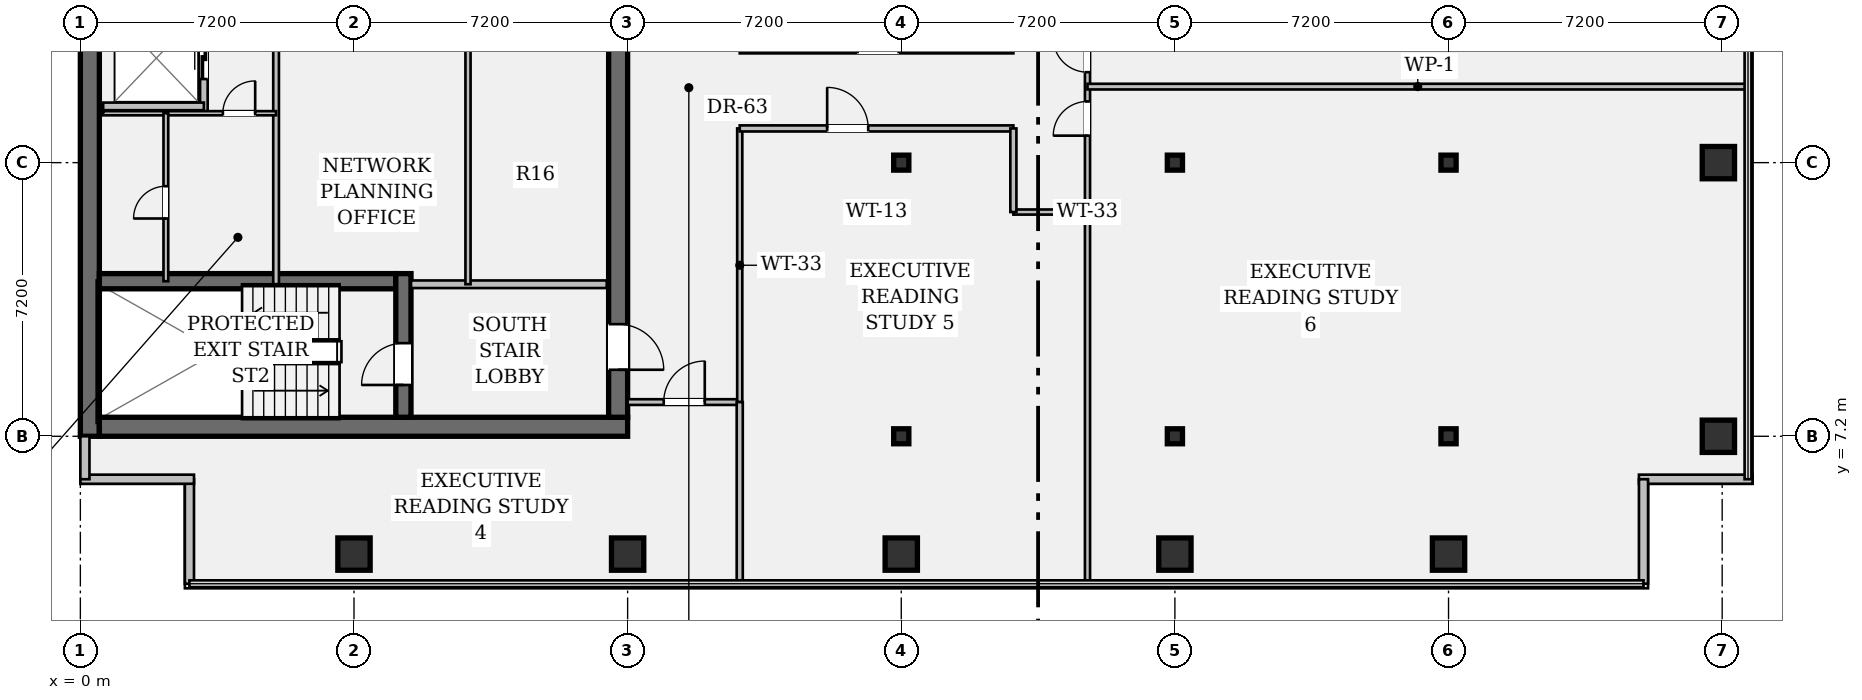
"""IFC4 building model, lengths in metres.
Left out: names, types, materials, properties, quantities, classifications, styles, units other than length and angle.
Written with IfcOpenShell. Run it as: python <this file> out.ifc"""

import sys

from ifc_helpers import new_model, si_unit, direction, frame, frame_2d, origin, origin_2d, place, context, subcontext, project, spatial, rectangle, hollow_rectangle, i_section, extrude, element, fill, save


model = new_model("IFC4")
c1 = context("Model", 3, precision=1e-05, world=origin(), true_north=direction((0.0, 1.0)))
c2 = subcontext(c1, "Body", "Model", "MODEL_VIEW")
j1 = project(units=[si_unit("LENGTHUNIT", "METRE"), si_unit("PLANEANGLEUNIT", "RADIAN")], contexts=[c1])
p1 = place(None, origin())
s1 = spatial("IfcSite", under=j1, at=p1, CompositionType="ELEMENT")
p2 = place(p1, origin())
s2 = spatial("IfcBuilding", under=s1, at=p2, CompositionType="ELEMENT")
p3 = place(p2, frame((0.0, 0.0, 180.25)))
s3 = spatial("IfcBuildingStorey", under=s2, at=p3, CompositionType="ELEMENT", Elevation=180.25)
p4 = place(p3, frame((0.25, 7.2, 0.0), z_axis=(0.0, 0.0, 1.0), x_axis=(0.0, 1.0, 0.0)))
e1 = element("IfcWall", 1, at=p4, inside=s3, PredefinedType="SHEAR", context=c2, shape_type="SweptSolid", body=[
    extrude(rectangle(XDim=28.8, YDim=0.5, at=frame_2d((14.4, 0.0))), origin(), (0.0, 0.0, 1.0), 3.24),
])
p5 = place(p3, frame((0.5, 7.45, 0.0), z_axis=(0.0, 0.0, 1.0), x_axis=(1.0, 0.0, 0.0)))
e2 = element("IfcWall", 2, at=p5, inside=s3, PredefinedType="SHEAR", context=c2, shape_type="SweptSolid", body=[
    extrude(rectangle(XDim=13.9, YDim=0.5, at=frame_2d((6.95, 0.0))), origin(), (0.0, 0.0, 1.0), 3.24),
])
p6 = place(p3, frame((14.15, 35.5, 0.0), z_axis=(0.0, 0.0, 1.0), x_axis=(0.0, -1.0, 0.0)))
e3 = element("IfcWall", 3, at=p6, inside=s3, PredefinedType="SHEAR", context=c2, shape_type="SweptSolid", body=[
    extrude(rectangle(XDim=27.8, YDim=0.5, at=frame_2d((13.9, 0.0))), origin(), (0.0, 0.0, 1.0), 3.24),
])
p7 = place(p6, frame((1.4, 0.0, 0.0)))
e4 = element("IfcOpeningElement", 4, at=p7, cuts=e3, PredefinedType="OPENING", context=c2, shape_type="SweptSolid", body=[
    extrude(rectangle(XDim=1.2, YDim=2.15, at=frame_2d((0.6, 1.075))), frame((0.0, 0.262, 0.0), z_axis=(0.0, -1.0, 0.0), x_axis=(1.0, 0.0, 0.0)), (0.0, 0.0, 1.0), 0.524),
])
p8 = place(p6, frame((25.35, 0.0, 0.0)))
e5 = element("IfcOpeningElement", 5, at=p8, cuts=e3, PredefinedType="OPENING", context=c2, shape_type="SweptSolid", body=[
    extrude(rectangle(XDim=1.2, YDim=2.15, at=frame_2d((0.6, 1.075))), frame((0.0, 0.262, 0.0), z_axis=(0.0, -1.0, 0.0), x_axis=(1.0, 0.0, 0.0)), (0.0, 0.0, 1.0), 0.524),
])
p9 = place(p6, frame((14.7, 0.0, 0.0)))
e6 = element("IfcOpeningElement", 6, at=p9, cuts=e3, PredefinedType="OPENING", context=c2, shape_type="SweptSolid", body=[
    extrude(rectangle(XDim=1.6, YDim=2.2, at=frame_2d((0.8, 1.1))), frame((0.0, 0.262, 0.0), z_axis=(0.0, -1.0, 0.0), x_axis=(1.0, 0.0, 0.0)), (0.0, 0.0, 1.0), 0.524),
])
p10 = place(p3, frame((0.5, 11.28, 0.0), z_axis=(0.0, 0.0, 1.0), x_axis=(1.0, 0.0, 0.0)))
e7 = element("IfcWall", 7, at=p10, inside=s3, PredefinedType="SHEAR", context=c2, shape_type="SweptSolid", body=[
    extrude(rectangle(XDim=7.8, YDim=0.4, at=frame_2d((3.9, 0.0))), origin(), (0.0, 0.0, 1.0), 3.24),
])
p11 = place(p3, frame((8.5, 7.7, 0.0), z_axis=(0.0, 0.0, 1.0), x_axis=(0.0, 1.0, 0.0)))
e8 = element("IfcWall", 8, at=p11, inside=s3, PredefinedType="SHEAR", context=c2, shape_type="SweptSolid", body=[
    extrude(rectangle(XDim=3.78, YDim=0.4, at=frame_2d((1.89, 0.0))), origin(), (0.0, 0.0, 1.0), 3.24),
])
p12 = place(p11, frame((0.85, 0.0, 0.0)))
e9 = element("IfcOpeningElement", 9, at=p12, cuts=e8, PredefinedType="OPENING", context=c2, shape_type="SweptSolid", body=[
    extrude(rectangle(XDim=1.1, YDim=2.15, at=frame_2d((0.55, 1.075))), frame((0.0, 0.212, 0.0), z_axis=(0.0, -1.0, 0.0), x_axis=(1.0, 0.0, 0.0)), (0.0, 0.0, 1.0), 0.424),
])
for number, where, z_axis, x_axis in (
    (10, (7.2, 4.1, 0.0), (0.0, 0.0, 1.0), (1.0, 0.0, 0.0)),
    (11, (14.4, 4.1, 0.0), (0.0, 0.0, 1.0), (1.0, 0.0, 0.0)),
    (12, (21.6, 4.1, 0.0), (0.0, 0.0, 1.0), (1.0, 0.0, 0.0)),
):
    element("IfcColumn", number, at=place(p3, frame(where, z_axis=z_axis, x_axis=x_axis)), inside=s3, PredefinedType="COLUMN", context=c2, shape_type="SweptSolid", body=[
        extrude(hollow_rectangle(XDim=0.85, YDim=0.85, WallThickness=0.05, at=origin_2d()), origin(), (0.0, 0.0, 1.0), 3.24),
    ])
for number, where, z_axis, x_axis in (
    (13, (21.6, 7.2, 0.0), (0.0, 0.0, 1.0), (1.0, 0.0, 0.0)),
    (14, (21.6, 14.4, 0.0), (0.0, 0.0, 1.0), (1.0, 0.0, 0.0)),
):
    element("IfcColumn", number, at=place(p3, frame(where, z_axis=z_axis, x_axis=x_axis)), inside=s3, PredefinedType="COLUMN", context=c2, shape_type="SweptSolid", body=[
        extrude(i_section(OverallWidth=0.399, OverallDepth=0.394, WebThickness=0.023, FlangeThickness=0.037, FilletRadius=0.018, at=origin_2d()), origin(), (0.0, 0.0, 1.0), 3.24),
    ])
p13 = place(p3, frame((28.8, 4.1, 0.0), z_axis=(0.0, 0.0, 1.0), x_axis=(1.0, 0.0, 0.0)))
e15 = element("IfcColumn", 15, at=p13, inside=s3, PredefinedType="COLUMN", context=c2, shape_type="SweptSolid", body=[
    extrude(hollow_rectangle(XDim=0.85, YDim=0.85, WallThickness=0.05, at=origin_2d()), origin(), (0.0, 0.0, 1.0), 3.24),
])
for number, where, z_axis, x_axis in (
    (16, (28.8, 7.2, 0.0), (0.0, 0.0, 1.0), (1.0, 0.0, 0.0)),
    (17, (28.8, 14.4, 0.0), (0.0, 0.0, 1.0), (1.0, 0.0, 0.0)),
):
    element("IfcColumn", number, at=place(p3, frame(where, z_axis=z_axis, x_axis=x_axis)), inside=s3, PredefinedType="COLUMN", context=c2, shape_type="SweptSolid", body=[
        extrude(i_section(OverallWidth=0.399, OverallDepth=0.394, WebThickness=0.023, FlangeThickness=0.037, FilletRadius=0.018, at=origin_2d()), origin(), (0.0, 0.0, 1.0), 3.24),
    ])
p14 = place(p3, frame((36.0, 4.1, 0.0), z_axis=(0.0, 0.0, 1.0), x_axis=(1.0, 0.0, 0.0)))
e18 = element("IfcColumn", 18, at=p14, inside=s3, PredefinedType="COLUMN", context=c2, shape_type="SweptSolid", body=[
    extrude(hollow_rectangle(XDim=0.85, YDim=0.85, WallThickness=0.05, at=origin_2d()), origin(), (0.0, 0.0, 1.0), 3.24),
])
for number, where, z_axis, x_axis in (
    (19, (36.0, 7.2, 0.0), (0.0, 0.0, 1.0), (1.0, 0.0, 0.0)),
    (20, (36.0, 14.4, 0.0), (0.0, 0.0, 1.0), (1.0, 0.0, 0.0)),
):
    element("IfcColumn", number, at=place(p3, frame(where, z_axis=z_axis, x_axis=x_axis)), inside=s3, PredefinedType="COLUMN", context=c2, shape_type="SweptSolid", body=[
        extrude(i_section(OverallWidth=0.399, OverallDepth=0.394, WebThickness=0.023, FlangeThickness=0.037, FilletRadius=0.018, at=origin_2d()), origin(), (0.0, 0.0, 1.0), 3.24),
    ])
for number, where, z_axis, x_axis in (
    (21, (43.1, 7.2, 0.0), (0.0, 0.0, 1.0), (1.0, 0.0, 0.0)),
    (22, (43.1, 14.4, 0.0), (0.0, 0.0, 1.0), (1.0, 0.0, 0.0)),
):
    element("IfcColumn", number, at=place(p3, frame(where, z_axis=z_axis, x_axis=x_axis)), inside=s3, PredefinedType="COLUMN", context=c2, shape_type="SweptSolid", body=[
        extrude(hollow_rectangle(XDim=0.85, YDim=0.85, WallThickness=0.05, at=origin_2d()), origin(), (0.0, 0.0, 1.0), 3.24),
    ])
p15 = place(p3, frame((2.87, 3.32, 0.0), z_axis=(0.0, 0.0, 1.0), x_axis=(0.0, 1.0, 0.0)))
e23 = element("IfcWall", 23, at=p15, inside=s3, PredefinedType="STANDARD", context=c2, shape_type="SweptSolid", body=[
    extrude(rectangle(XDim=2.75, YDim=0.24, at=frame_2d((1.375, 0.0))), origin(), (0.0, 0.0, 1.0), 3.24),
])
p16 = place(p3, frame((2.99, 6.07, 0.0), z_axis=(0.0, 0.0, 1.0), x_axis=(-1.0, 0.0, 0.0)))
e24 = element("IfcWall", 24, at=p16, inside=s3, PredefinedType="STANDARD", context=c2, shape_type="SweptSolid", body=[
    extrude(rectangle(XDim=2.99, YDim=0.24, at=frame_2d((1.495, 0.0))), origin(), (0.0, 0.0, 1.0), 3.24),
])
p17 = place(p3, frame((0.12, 6.07, 0.0), z_axis=(0.0, 0.0, 1.0), x_axis=(0.0, 1.0, 0.0)))
e25 = element("IfcWall", 25, at=p17, inside=s3, PredefinedType="STANDARD", context=c2, shape_type="SweptSolid", body=[
    extrude(rectangle(XDim=1.13, YDim=0.24, at=frame_2d((0.565, 0.0))), origin(), (0.0, 0.0, 1.0), 3.24),
])
p18 = place(p3, frame((44.0, 6.07, 0.0), z_axis=(0.0, 0.0, 1.0), x_axis=(-1.0, 0.0, 0.0)))
e26 = element("IfcWall", 26, at=p18, inside=s3, PredefinedType="STANDARD", context=c2, shape_type="SweptSolid", body=[
    extrude(rectangle(XDim=2.99, YDim=0.24, at=frame_2d((1.495, 0.0))), origin(), (0.0, 0.0, 1.0), 3.24),
])
p19 = place(p3, frame((41.13, 6.07, 0.0), z_axis=(0.0, 0.0, 1.0), x_axis=(0.0, -1.0, 0.0)))
e27 = element("IfcWall", 27, at=p19, inside=s3, PredefinedType="STANDARD", context=c2, shape_type="SweptSolid", body=[
    extrude(rectangle(XDim=2.75, YDim=0.24, at=frame_2d((1.375, 0.0))), origin(), (0.0, 0.0, 1.0), 3.24),
])
p20 = place(p3, frame((8.7, 11.2, 0.0), z_axis=(0.0, 0.0, 1.0), x_axis=(1.0, 0.0, 0.0)))
e28 = element("IfcWall", 28, at=p20, inside=s3, PredefinedType="PARTITIONING", context=c2, shape_type="SweptSolid", body=[
    extrude(rectangle(XDim=5.15, YDim=0.2, at=frame_2d((2.575, 0.0))), origin(), (0.0, 0.0, 1.0), 3.24),
])
p21 = place(p3, frame((3.25, 15.7, 0.0), z_axis=(0.0, 0.0, 1.0), x_axis=(0.0, 1.0, 0.0)))
e29 = element("IfcWall", 29, at=p21, inside=s3, PredefinedType="PARTITIONING", context=c2, shape_type="SweptSolid", body=[
    extrude(rectangle(XDim=13.08, YDim=0.2, at=frame_2d((6.54, 0.0))), origin(), (0.0, 0.0, 1.0), 3.24),
])
p22 = place(p21, frame((0.9, 0.0, 0.0)))
e30 = element("IfcOpeningElement", 30, at=p22, cuts=e29, PredefinedType="OPENING", context=c2, shape_type="SweptSolid", body=[
    extrude(rectangle(XDim=1.1, YDim=2.2, at=frame_2d((0.55, 1.1))), frame((0.0, 0.112, 0.0), z_axis=(0.0, -1.0, 0.0), x_axis=(1.0, 0.0, 0.0)), (0.0, 0.0, 1.0), 0.224),
])
p23 = place(p21, frame((3.5, 0.0, 0.0)))
e31 = element("IfcOpeningElement", 31, at=p23, cuts=e29, PredefinedType="OPENING", context=c2, shape_type="SweptSolid", body=[
    extrude(rectangle(XDim=1.1, YDim=2.2, at=frame_2d((0.55, 1.1))), frame((0.0, 0.112, 0.0), z_axis=(0.0, -1.0, 0.0), x_axis=(1.0, 0.0, 0.0)), (0.0, 0.0, 1.0), 0.224),
])
p24 = place(p21, frame((7.2, 0.0, 0.0)))
e32 = element("IfcOpeningElement", 32, at=p24, cuts=e29, PredefinedType="OPENING", context=c2, shape_type="SweptSolid", body=[
    extrude(rectangle(XDim=1.1, YDim=2.2, at=frame_2d((0.55, 1.1))), frame((0.0, 0.112, 0.0), z_axis=(0.0, -1.0, 0.0), x_axis=(1.0, 0.0, 0.0)), (0.0, 0.0, 1.0), 0.224),
])
p25 = place(p21, frame((9.8, 0.0, 0.0)))
e33 = element("IfcOpeningElement", 33, at=p25, cuts=e29, PredefinedType="OPENING", context=c2, shape_type="SweptSolid", body=[
    extrude(rectangle(XDim=1.1, YDim=2.2, at=frame_2d((0.55, 1.1))), frame((0.0, 0.112, 0.0), z_axis=(0.0, -1.0, 0.0), x_axis=(1.0, 0.0, 0.0)), (0.0, 0.0, 1.0), 0.224),
])
p26 = place(p3, frame((0.6, 15.88, 0.0), z_axis=(0.0, 0.0, 1.0), x_axis=(1.0, 0.0, 0.0)))
e34 = element("IfcWall", 34, at=p26, inside=s3, PredefinedType="PARTITIONING", context=c2, shape_type="SweptSolid", body=[
    extrude(rectangle(XDim=2.65, YDim=0.2, at=frame_2d((1.325, 0.0))), origin(), (0.0, 0.0, 1.0), 3.24),
])
p27 = place(p3, frame((5.15, 11.2, 0.0), z_axis=(0.0, 0.0, 1.0), x_axis=(0.0, 1.0, 0.0)))
e35 = element("IfcWall", 35, at=p27, inside=s3, PredefinedType="PARTITIONING", context=c2, shape_type="SweptSolid", body=[
    extrude(rectangle(XDim=6.6, YDim=0.15, at=frame_2d((3.3, 0.0))), origin(), (0.0, 0.0, 1.0), 3.24),
])
p28 = place(p3, frame((10.2, 11.2, 0.0), z_axis=(0.0, 0.0, 1.0), x_axis=(0.0, 1.0, 0.0)))
e36 = element("IfcWall", 36, at=p28, inside=s3, PredefinedType="PARTITIONING", context=c2, shape_type="SweptSolid", body=[
    extrude(rectangle(XDim=6.6, YDim=0.135, at=frame_2d((3.3, 0.0))), origin(), (0.0, 0.0, 1.0), 3.24),
])
p29 = place(p3, frame((0.6, 15.7, 0.0), z_axis=(0.0, 0.0, 1.0), x_axis=(1.0, 0.0, 0.0)))
e37 = element("IfcWall", 37, at=p29, inside=s3, PredefinedType="PARTITIONING", context=c2, shape_type="SweptSolid", body=[
    extrude(rectangle(XDim=4.55, YDim=0.11, at=frame_2d((2.275, 0.0))), origin(), (0.0, 0.0, 1.0), 3.24),
])
p30 = place(p29, frame((3.15, 0.0, 0.0)))
e38 = element("IfcOpeningElement", 38, at=p30, cuts=e37, PredefinedType="OPENING", context=c2, shape_type="SweptSolid", body=[
    extrude(rectangle(XDim=0.85, YDim=2.15, at=frame_2d((0.425, 1.075))), frame((0.0, 0.067, 0.0), z_axis=(0.0, -1.0, 0.0), x_axis=(1.0, 0.0, 0.0)), (0.0, 0.0, 1.0), 0.134),
])
p31 = place(p3, frame((2.25, 11.28, 0.0), z_axis=(0.0, 0.0, 1.0), x_axis=(0.0, 1.0, 0.0)))
e39 = element("IfcWall", 39, at=p31, inside=s3, PredefinedType="PARTITIONING", context=c2, shape_type="SweptSolid", body=[
    extrude(rectangle(XDim=4.42, YDim=0.125, at=frame_2d((2.21, 0.0))), origin(), (0.0, 0.0, 1.0), 3.24),
])
p32 = place(p31, frame((1.65, 0.0, 0.0)))
e40 = element("IfcOpeningElement", 40, at=p32, cuts=e39, PredefinedType="OPENING", context=c2, shape_type="SweptSolid", body=[
    extrude(rectangle(XDim=0.85, YDim=2.15, at=frame_2d((0.425, 1.075))), frame((0.0, 0.074, 0.0), z_axis=(0.0, -1.0, 0.0), x_axis=(1.0, 0.0, 0.0)), (0.0, 0.0, 1.0), 0.149),
])
p33 = place(p3, frame((14.4, 8.1, 0.0), z_axis=(0.0, 0.0, 1.0), x_axis=(1.0, 0.0, 0.0)))
e41 = element("IfcWall", 41, at=p33, inside=s3, PredefinedType="PARTITIONING", context=c2, shape_type="SweptSolid", body=[
    extrude(rectangle(XDim=2.95, YDim=0.15, at=frame_2d((1.475, 0.0))), origin(), (0.0, 0.0, 1.0), 2.808),
])
p34 = place(p33, frame((0.95, 0.0, 0.0)))
e42 = element("IfcOpeningElement", 42, at=p34, cuts=e41, PredefinedType="OPENING", context=c2, shape_type="SweptSolid", body=[
    extrude(rectangle(XDim=1.08, YDim=2.15, at=frame_2d((0.54, 1.075))), frame((0.0, 0.087, 0.0), z_axis=(0.0, -1.0, 0.0), x_axis=(1.0, 0.0, 0.0)), (0.0, 0.0, 1.0), 0.174),
])
p35 = place(p3, frame((17.35, 8.1, 0.0), z_axis=(0.0, 0.0, 1.0), x_axis=(0.0, 1.0, 0.0)))
e43 = element("IfcWall", 43, at=p35, inside=s3, PredefinedType="PARTITIONING", context=c2, shape_type="SweptSolid", body=[
    extrude(rectangle(XDim=7.2, YDim=0.135, at=frame_2d((3.6, 0.0))), origin(), (0.0, 0.0, 1.0), 2.603),
])
p36 = place(p3, frame((17.35, 15.3, 0.0), z_axis=(0.0, 0.0, 1.0), x_axis=(1.0, 0.0, 0.0)))
e44 = element("IfcWall", 44, at=p36, inside=s3, PredefinedType="PARTITIONING", context=c2, shape_type="SweptSolid", body=[
    extrude(rectangle(XDim=7.2, YDim=0.16, at=frame_2d((3.6, 0.0))), origin(), (0.0, 0.0, 1.0), 2.603),
])
p37 = place(p36, frame((2.3, 0.0, 0.0)))
e45 = element("IfcOpeningElement", 45, at=p37, cuts=e44, PredefinedType="OPENING", context=c2, shape_type="SweptSolid", body=[
    extrude(rectangle(XDim=1.08, YDim=2.15, at=frame_2d((0.54, 1.075))), frame((0.0, 0.092, 0.0), z_axis=(0.0, -1.0, 0.0), x_axis=(1.0, 0.0, 0.0)), (0.0, 0.0, 1.0), 0.184),
])
p38 = place(p3, frame((17.35, 17.35, 0.0), z_axis=(0.0, 0.0, 1.0), x_axis=(1.0, 0.0, 0.0)))
e46 = element("IfcWall", 46, at=p38, inside=s3, PredefinedType="PARTITIONING", context=c2, shape_type="SweptSolid", body=[
    extrude(rectangle(XDim=7.2, YDim=0.15, at=frame_2d((3.6, 0.0))), origin(), (0.0, 0.0, 1.0), 2.603),
])
p39 = place(p38, frame((3.1, 0.0, 0.0)))
e47 = element("IfcOpeningElement", 47, at=p39, cuts=e46, PredefinedType="OPENING", context=c2, shape_type="SweptSolid", body=[
    extrude(rectangle(XDim=1.08, YDim=2.15, at=frame_2d((0.54, 1.075))), frame((0.0, 0.087, 0.0), z_axis=(0.0, -1.0, 0.0), x_axis=(1.0, 0.0, 0.0)), (0.0, 0.0, 1.0), 0.174),
])
p40 = place(p3, frame((24.55, 13.1, 0.0), z_axis=(0.0, 0.0, 1.0), x_axis=(1.0, 0.0, 0.0)))
e48 = element("IfcWall", 48, at=p40, inside=s3, PredefinedType="PARTITIONING", context=c2, shape_type="SweptSolid", body=[
    extrude(rectangle(XDim=1.95, YDim=0.135, at=frame_2d((0.975, 0.0))), origin(), (0.0, 0.0, 1.0), 2.808),
])
p41 = place(p3, frame((24.55, 13.1, 0.0), z_axis=(0.0, 0.0, 1.0), x_axis=(0.0, 1.0, 0.0)))
e49 = element("IfcWall", 49, at=p41, inside=s3, PredefinedType="PARTITIONING", context=c2, shape_type="SweptSolid", body=[
    extrude(rectangle(XDim=2.2, YDim=0.16, at=frame_2d((1.1, 0.0))), origin(), (0.0, 0.0, 1.0), 2.603),
])
p42 = place(p3, frame((26.5, 3.32, 0.0), z_axis=(0.0, 0.0, 1.0), x_axis=(0.0, 1.0, 0.0)))
e50 = element("IfcWall", 50, at=p42, inside=s3, PredefinedType="PARTITIONING", context=c2, shape_type="SweptSolid", body=[
    extrude(rectangle(XDim=21.76, YDim=0.135, at=frame_2d((10.88, 0.0))), origin(), (0.0, 0.0, 1.0), 2.603),
])
p43 = place(p42, frame((11.79, 0.0, 0.0)))
e51 = element("IfcOpeningElement", 51, at=p43, cuts=e50, PredefinedType="OPENING", context=c2, shape_type="SweptSolid", body=[
    extrude(rectangle(XDim=0.9, YDim=2.15, at=frame_2d((0.45, 1.075))), frame((0.0, 0.08, 0.0), z_axis=(0.0, -1.0, 0.0), x_axis=(1.0, 0.0, 0.0)), (0.0, 0.0, 1.0), 0.159),
])
p44 = place(p42, frame((13.46, 0.0, 0.0)))
e52 = element("IfcOpeningElement", 52, at=p44, cuts=e50, PredefinedType="OPENING", context=c2, shape_type="SweptSolid", body=[
    extrude(rectangle(XDim=0.9, YDim=2.15, at=frame_2d((0.45, 1.075))), frame((0.0, 0.08, 0.0), z_axis=(0.0, -1.0, 0.0), x_axis=(1.0, 0.0, 0.0)), (0.0, 0.0, 1.0), 0.159),
])
p45 = place(p3, frame((17.35, 3.32, 0.0), z_axis=(0.0, 0.0, 1.0), x_axis=(0.0, 1.0, 0.0)))
e53 = element("IfcWall", 53, at=p45, inside=s3, PredefinedType="PARTITIONING", context=c2, shape_type="SweptSolid", body=[
    extrude(rectangle(XDim=4.78, YDim=0.16, at=frame_2d((2.39, 0.0))), origin(), (0.0, 0.0, 1.0), 2.603),
])
p46 = place(p3, frame((26.5, 16.4, 0.0), z_axis=(0.0, 0.0, 1.0), x_axis=(1.0, 0.0, 0.0)))
e54 = element("IfcWall", 54, at=p46, inside=s3, PredefinedType="PARTITIONING", context=c2, shape_type="SweptSolid", body=[
    extrude(rectangle(XDim=17.38, YDim=0.15, at=frame_2d((8.69, 0.0))), origin(), (0.0, 0.0, 1.0), 2.603),
])
p47 = place(p12, origin())
e55 = element("IfcDoor", 55, at=p47, inside=s3, OperationType="SINGLE_SWING_LEFT", PredefinedType="DOOR", context=c2, shape_type="SweptSolid", body=[
    extrude(rectangle(XDim=1.1, YDim=2.15, at=frame_2d((0.55, 1.075))), frame((0.0, 0.025, 0.0), z_axis=(0.0, -1.0, 0.0), x_axis=(1.0, 0.0, 0.0)), (0.0, 0.0, 1.0), 0.05),
])
fill(e9, e55)
p48 = place(p8, origin())
e56 = element("IfcDoor", 56, at=p48, inside=s3, OperationType="SINGLE_SWING_RIGHT", PredefinedType="DOOR", context=c2, shape_type="SweptSolid", body=[
    extrude(rectangle(XDim=1.2, YDim=2.15, at=frame_2d((0.6, 1.075))), frame((0.0, 0.025, 0.0), z_axis=(0.0, -1.0, 0.0), x_axis=(1.0, 0.0, 0.0)), (0.0, 0.0, 1.0), 0.05),
])
fill(e5, e56)
p49 = place(p22, origin())
e57 = element("IfcDoor", 57, at=p49, inside=s3, OperationType="DOUBLE_DOOR_SLIDING", PredefinedType="DOOR", context=c2, shape_type="SweptSolid", body=[
    extrude(rectangle(XDim=1.1, YDim=2.2, at=frame_2d((0.55, 1.1))), frame((0.0, 0.025, 0.0), z_axis=(0.0, -1.0, 0.0), x_axis=(1.0, 0.0, 0.0)), (0.0, 0.0, 1.0), 0.05),
])
fill(e30, e57)
p50 = place(p30, origin())
e58 = element("IfcDoor", 58, at=p50, inside=s3, OperationType="SINGLE_SWING_RIGHT", PredefinedType="DOOR", context=c2, shape_type="SweptSolid", body=[
    extrude(rectangle(XDim=0.85, YDim=2.15, at=frame_2d((0.425, 1.075))), frame((0.0, 0.025, 0.0), z_axis=(0.0, -1.0, 0.0), x_axis=(1.0, 0.0, 0.0)), (0.0, 0.0, 1.0), 0.05),
])
fill(e38, e58)
p51 = place(p32, origin())
e59 = element("IfcDoor", 59, at=p51, inside=s3, OperationType="SINGLE_SWING_LEFT", PredefinedType="DOOR", context=c2, shape_type="SweptSolid", body=[
    extrude(rectangle(XDim=0.85, YDim=2.15, at=frame_2d((0.425, 1.075))), frame((0.0, 0.025, 0.0), z_axis=(0.0, -1.0, 0.0), x_axis=(1.0, 0.0, 0.0)), (0.0, 0.0, 1.0), 0.05),
])
fill(e40, e59)
p52 = place(p34, origin())
e60 = element("IfcDoor", 60, at=p52, inside=s3, OperationType="SINGLE_SWING_RIGHT", PredefinedType="DOOR", context=c2, shape_type="SweptSolid", body=[
    extrude(rectangle(XDim=1.08, YDim=2.15, at=frame_2d((0.54, 1.075))), frame((0.0, 0.025, 0.0), z_axis=(0.0, -1.0, 0.0), x_axis=(1.0, 0.0, 0.0)), (0.0, 0.0, 1.0), 0.05),
])
fill(e42, e60)
p53 = place(p37, origin())
e61 = element("IfcDoor", 61, at=p53, inside=s3, OperationType="SINGLE_SWING_LEFT", PredefinedType="DOOR", context=c2, shape_type="SweptSolid", body=[
    extrude(rectangle(XDim=1.08, YDim=2.15, at=frame_2d((0.54, 1.075))), frame((0.0, 0.025, 0.0), z_axis=(0.0, -1.0, 0.0), x_axis=(1.0, 0.0, 0.0)), (0.0, 0.0, 1.0), 0.05),
])
fill(e45, e61)
p54 = place(p43, origin())
e62 = element("IfcDoor", 62, at=p54, inside=s3, OperationType="SINGLE_SWING_LEFT", PredefinedType="DOOR", context=c2, shape_type="SweptSolid", body=[
    extrude(rectangle(XDim=0.9, YDim=2.15, at=frame_2d((0.45, 1.075))), frame((0.0, 0.025, 0.0), z_axis=(0.0, -1.0, 0.0), x_axis=(1.0, 0.0, 0.0)), (0.0, 0.0, 1.0), 0.05),
])
fill(e51, e62)
p55 = place(p44, origin())
e63 = element("IfcDoor", 63, at=p55, inside=s3, OperationType="SINGLE_SWING_RIGHT", PredefinedType="DOOR", context=c2, shape_type="SweptSolid", body=[
    extrude(rectangle(XDim=0.9, YDim=2.15, at=frame_2d((0.45, 1.075))), frame((0.0, 0.025, 0.0), z_axis=(0.0, -1.0, 0.0), x_axis=(1.0, 0.0, 0.0)), (0.0, 0.0, 1.0), 0.05),
])
fill(e52, e63)
save(model, sys.argv[1])
